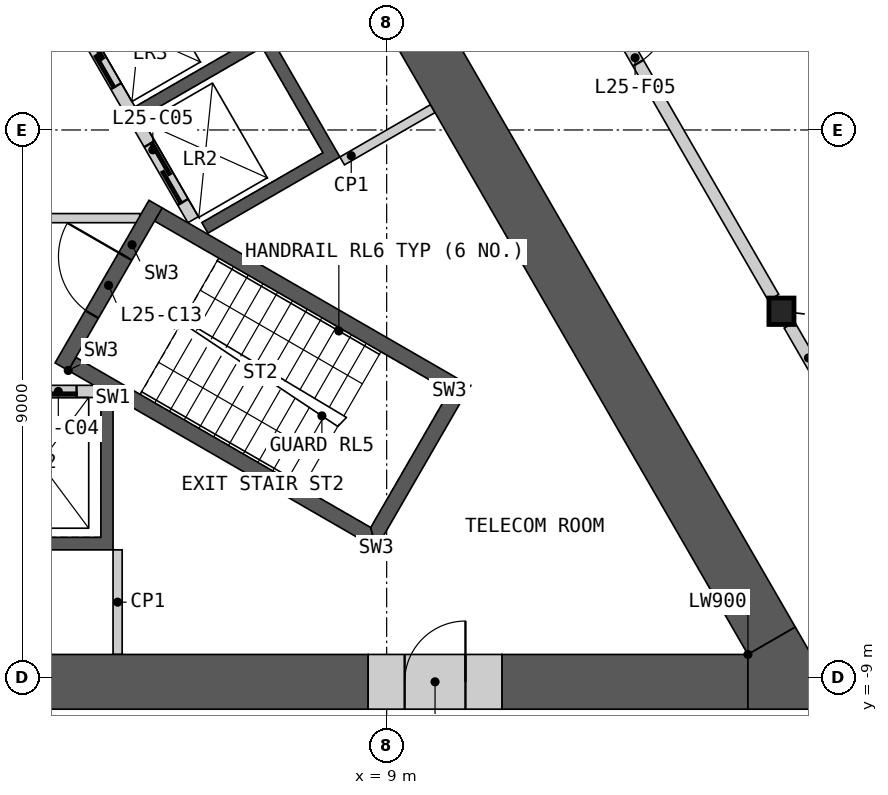
"""IFC4 building model, lengths in metres.
Left out: names, types, materials, properties, quantities, classifications, styles, units other than length and angle.
Written with IfcOpenShell. Run it as: python <this file> out.ifc"""

import sys

from ifc_helpers import new_model, si_unit, direction, frame, frame_2d, origin, origin_2d, place, context, subcontext, project, spatial, polyline, rectangle, i_section, outline, extrude, element, fill, save


model = new_model("IFC4")
c1 = context("Model", 3, precision=1e-05, world=origin(), true_north=direction((0.0, 1.0)))
c2 = subcontext(c1, "Body", "Model", "MODEL_VIEW")
j1 = project(units=[si_unit("LENGTHUNIT", "METRE"), si_unit("PLANEANGLEUNIT", "RADIAN")], contexts=[c1])
p1 = place(None, origin())
s1 = spatial("IfcSite", under=j1, at=p1, CompositionType="ELEMENT")
p2 = place(p1, origin())
s2 = spatial("IfcBuilding", under=s1, at=p2, CompositionType="ELEMENT")
p3 = place(p2, frame((0.0, 0.0, 120.6)))
s3 = spatial("IfcBuildingStorey", under=s2, at=p3, CompositionType="ELEMENT", Elevation=120.6)
p4 = place(p3, frame((15.493, -2.982, 0.0), z_axis=(0.0, 0.0, 1.0), x_axis=(1.0, 0.0, 0.0)))
e1 = element("IfcColumn", 1, at=p4, inside=s3, PredefinedType="COLUMN", context=c2, shape_type="SweptSolid", body=[
    extrude(i_section(OverallWidth=0.412, OverallDepth=0.435, WebThickness=0.036, FlangeThickness=0.057, at=origin_2d()), origin(), (0.0, 0.0, 1.0), 4.2),
])
p5 = place(p3, origin())
e2 = element("IfcWall", 2, at=p5, inside=s3, PredefinedType="SHEAR", context=c2, shape_type="SweptSolid", body=[
    extrude(outline(polyline([(4.5, -4.4), (4.5, -6.906), (-4.5, -6.906), (-4.5, -4.4), (-4.3, -4.4), (-4.3, -6.7), (-2.3, -6.7), (-2.3, -4.4), (-2.1, -4.4), (-2.1, -6.7), (-0.1, -6.7), (-0.1, -4.4), (0.1, -4.4), (0.1, -6.7), (2.1, -6.7), (2.1, -4.4), (2.3, -4.4), (2.3, -6.7), (4.3, -6.7), (4.3, -4.4), (4.5, -4.4)])), origin(), (0.0, 0.0, 1.0), 3.8),
])
p6 = place(p3, frame((-4.187, -4.3, 0.0), z_axis=(0.0, 0.0, 1.0), x_axis=(1.0, 0.0, 0.0)))
e3 = element("IfcWall", 3, at=p6, inside=s3, PredefinedType="SOLIDWALL", context=c2, shape_type="SweptSolid", body=[
    extrude(rectangle(XDim=8.373, YDim=0.2, at=frame_2d((4.187, 0.0))), origin(), (0.0, 0.0, 1.0), 3.8),
])
p7 = place(p6, frame((0.287, 0.0, 0.0)))
e4 = element("IfcOpeningElement", 4, at=p7, cuts=e3, PredefinedType="OPENING", context=c2, shape_type="SweptSolid", body=[
    extrude(rectangle(XDim=1.2, YDim=2.1, at=frame_2d((0.6, 1.05))), frame((0.0, 0.11, 0.0), z_axis=(0.0, -1.0, 0.0), x_axis=(1.0, 0.0, 0.0)), (0.0, 0.0, 1.0), 0.22),
])
p8 = place(p6, frame((2.387, 0.0, 0.0)))
e5 = element("IfcOpeningElement", 5, at=p8, cuts=e3, PredefinedType="OPENING", context=c2, shape_type="SweptSolid", body=[
    extrude(rectangle(XDim=1.4, YDim=2.1, at=frame_2d((0.7, 1.05))), frame((0.0, 0.11, 0.0), z_axis=(0.0, -1.0, 0.0), x_axis=(1.0, 0.0, 0.0)), (0.0, 0.0, 1.0), 0.22),
])
p9 = place(p6, frame((4.737, 0.0, 0.0)))
e6 = element("IfcOpeningElement", 6, at=p9, cuts=e3, PredefinedType="OPENING", context=c2, shape_type="SweptSolid", body=[
    extrude(rectangle(XDim=1.1, YDim=2.1, at=frame_2d((0.55, 1.05))), frame((0.0, 0.11, 0.0), z_axis=(0.0, -1.0, 0.0), x_axis=(1.0, 0.0, 0.0)), (0.0, 0.0, 1.0), 0.22),
])
p10 = place(p6, frame((6.887, 0.0, 0.0)))
e7 = element("IfcOpeningElement", 7, at=p10, cuts=e3, PredefinedType="OPENING", context=c2, shape_type="SweptSolid", body=[
    extrude(rectangle(XDim=1.2, YDim=2.1, at=frame_2d((0.6, 1.05))), frame((0.0, 0.11, 0.0), z_axis=(0.0, -1.0, 0.0), x_axis=(1.0, 0.0, 0.0)), (0.0, 0.0, 1.0), 0.22),
])
p11 = place(p3, origin())
e8 = element("IfcWall", 8, at=p11, inside=s3, PredefinedType="SHEAR", context=c2, shape_type="SweptSolid", body=[
    extrude(outline(polyline([(2.66, 4.192), (4.831, 5.445), (8.231, -0.444), (6.061, -1.697), (5.96, -1.524), (7.952, -0.374), (6.952, 1.358), (4.96, 0.208), (4.861, 0.381), (6.852, 1.531), (5.852, 3.263), (3.861, 2.113), (3.76, 2.287), (5.752, 3.437), (4.752, 5.169), (2.76, 4.019), (2.66, 4.192)])), origin(), (0.0, 0.0, 1.0), 3.8),
])
p12 = place(p3, frame((5.817, -1.476, 0.0), z_axis=(0.0, 0.0, 1.0), x_axis=(-0.500002616675, 0.866023893041, 0.0)))
e9 = element("IfcWall", 9, at=p12, inside=s3, PredefinedType="SOLIDWALL", context=c2, shape_type="SweptSolid", body=[
    extrude(rectangle(XDim=8.373, YDim=0.2, at=frame_2d((4.187, 0.0))), origin(), (0.0, 0.0, 1.0), 3.8),
])
p13 = place(p12, frame((0.337, 0.0, 0.0)))
e10 = element("IfcOpeningElement", 10, at=p13, cuts=e9, PredefinedType="OPENING", context=c2, shape_type="SweptSolid", body=[
    extrude(rectangle(XDim=1.1, YDim=2.1, at=frame_2d((0.55, 1.05))), frame((0.0, 0.11, 0.0), z_axis=(0.0, -1.0, 0.0), x_axis=(1.0, 0.0, 0.0)), (0.0, 0.0, 1.0), 0.22),
])
p14 = place(p12, frame((2.537, 0.0, 0.0)))
e11 = element("IfcOpeningElement", 11, at=p14, cuts=e9, PredefinedType="OPENING", context=c2, shape_type="SweptSolid", body=[
    extrude(rectangle(XDim=1.1, YDim=2.1, at=frame_2d((0.55, 1.05))), frame((0.0, 0.11, 0.0), z_axis=(0.0, -1.0, 0.0), x_axis=(1.0, 0.0, 0.0)), (0.0, 0.0, 1.0), 0.22),
])
p15 = place(p12, frame((4.737, 0.0, 0.0)))
e12 = element("IfcOpeningElement", 12, at=p15, cuts=e9, PredefinedType="OPENING", context=c2, shape_type="SweptSolid", body=[
    extrude(rectangle(XDim=1.1, YDim=2.1, at=frame_2d((0.55, 1.05))), frame((0.0, 0.11, 0.0), z_axis=(0.0, -1.0, 0.0), x_axis=(1.0, 0.0, 0.0)), (0.0, 0.0, 1.0), 0.22),
])
p16 = place(p12, frame((7.037, 0.0, 0.0)))
e13 = element("IfcOpeningElement", 13, at=p16, cuts=e9, PredefinedType="OPENING", context=c2, shape_type="SweptSolid", body=[
    extrude(rectangle(XDim=0.9, YDim=2.1, at=frame_2d((0.45, 1.05))), frame((0.0, 0.11, 0.0), z_axis=(0.0, -1.0, 0.0), x_axis=(1.0, 0.0, 0.0)), (0.0, 0.0, 1.0), 0.22),
])
p17 = place(p3, frame((-4.941, -1.45, 0.0), z_axis=(0.0, 0.0, 1.0), x_axis=(1.0, 0.0, 0.0)))
e14 = element("IfcWall", 14, at=p17, inside=s3, PredefinedType="PARTITIONING", context=c2, shape_type="SweptSolid", body=[
    extrude(rectangle(XDim=9.882, YDim=0.15, at=frame_2d((4.941, 0.0))), origin(), (0.0, 0.0, 1.0), 3.8),
])
p18 = place(p17, frame((4.391, 0.0, 0.0)))
e15 = element("IfcOpeningElement", 15, at=p18, cuts=e14, PredefinedType="OPENING", context=c2, shape_type="SweptSolid", body=[
    extrude(rectangle(XDim=1.1, YDim=2.1, at=frame_2d((0.55, 1.05))), frame((0.0, 0.085, 0.0), z_axis=(0.0, -1.0, 0.0), x_axis=(1.0, 0.0, 0.0)), (0.0, 0.0, 1.0), 0.17),
])
p19 = place(p3, origin())
e16 = element("IfcWall", 16, at=p19, inside=s3, PredefinedType="SHEAR", context=c2, shape_type="SweptSolid", body=[
    extrude(outline(polyline([(3.763, -3.956), (8.83, -6.881), (8.738, -6.539), (3.888, -3.739), (3.763, -3.956)])), origin(), (0.0, 0.0, 1.0), 3.8),
])
p20 = place(p3, origin())
e17 = element("IfcWall", 17, at=p20, inside=s3, PredefinedType="SHEAR", context=c2, shape_type="SweptSolid", body=[
    extrude(outline(polyline([(8.83, -6.881), (10.374, -4.206), (10.032, -4.298), (8.738, -6.539), (8.83, -6.881)])), origin(), (0.0, 0.0, 1.0), 3.8),
])
p21 = place(p3, origin())
e18 = element("IfcWall", 18, at=p21, inside=s3, PredefinedType="SHEAR", context=c2, shape_type="SweptSolid", body=[
    extrude(outline(polyline([(10.032, -4.298), (10.374, -4.206), (5.307, -1.281), (5.182, -1.498), (10.032, -4.298)])), origin(), (0.0, 0.0, 1.0), 3.8),
])
p22 = place(p3, frame((3.655, -3.893, 0.0), z_axis=(0.0, 0.0, 1.0), x_axis=(0.499982516597, 0.866035497597, 0.0)))
e19 = element("IfcWall", 19, at=p22, inside=s3, PredefinedType="SHEAR", context=c2, shape_type="SweptSolid", body=[
    extrude(rectangle(XDim=3.088, YDim=0.25, at=frame_2d((1.544, 0.0))), origin(), (0.0, 0.0, 1.0), 3.8),
])
p23 = place(p22, frame((0.994, 0.0, 0.0)))
e20 = element("IfcOpeningElement", 20, at=p23, cuts=e19, PredefinedType="OPENING", context=c2, shape_type="SweptSolid", body=[
    extrude(rectangle(XDim=1.1, YDim=2.1, at=frame_2d((0.55, 1.05))), frame((0.0, 0.135, 0.0), z_axis=(0.0, -1.0, 0.0), x_axis=(1.0, 0.0, 0.0)), (0.0, 0.0, 1.0), 0.27),
])
for number, where, z_axis, x_axis in (
    (21, (4.575, -6.906, 0.0), (0.0, 0.0, 1.0), (0.0, -1.0, 0.0)),
    (22, (8.268, -0.509, 0.0), (0.0, 0.0, 1.0), (0.866, 0.5, 0.0)),
):
    element("IfcWall", number, at=place(p3, frame(where, z_axis=z_axis, x_axis=x_axis)), inside=s3, PredefinedType="PARTITIONING", context=c2, shape_type="SweptSolid", body=[
        extrude(rectangle(XDim=1.72, YDim=0.15, at=frame_2d((0.86, 0.0))), origin(), (0.0, 0.0, 1.0), 3.8),
    ])
p24 = place(p3, frame((1.1, -9.076, 0.0), z_axis=(0.0, 0.0, 1.0), x_axis=(1.0, 0.0, 0.0)))
e23 = element("IfcWall", 23, at=p24, inside=s3, PredefinedType="SHEAR", context=c2, shape_type="SweptSolid", body=[
    extrude(rectangle(XDim=7.595, YDim=0.9, at=frame_2d((3.798, 0.0))), origin(), (0.0, 0.0, 1.0), 3.8),
])
p25 = place(p3, frame((10.896, -9.076, 0.0), z_axis=(0.0, 0.0, 1.0), x_axis=(1.0, 0.0, 0.0)))
e24 = element("IfcWall", 24, at=p25, inside=s3, PredefinedType="SHEAR", context=c2, shape_type="SweptSolid", body=[
    extrude(rectangle(XDim=4.046, YDim=0.9, at=frame_2d((2.023, 0.0))), origin(), (0.0, 0.0, 1.0), 3.8),
])
p26 = place(p3, frame((15.331, -8.401, 0.0), z_axis=(0.0, 0.0, 1.0), x_axis=(-0.49999216708, 0.866029926076, 0.0)))
e25 = element("IfcWall", 25, at=p26, inside=s3, PredefinedType="SHEAR", context=c2, shape_type="SweptSolid", body=[
    extrude(rectangle(XDim=12.641, YDim=0.9, at=frame_2d((6.321, 0.0))), origin(), (0.0, 0.0, 1.0), 3.8),
])
p27 = place(p3, origin())
e26 = element("IfcWall", 26, at=p27, inside=s3, PredefinedType="SHEAR", context=c2, shape_type="SweptSolid", body=[
    extrude(outline(polyline([(14.941, -8.626), (15.721, -8.176), (16.5, -9.526), (14.941, -9.526), (14.941, -8.626)])), origin(), (0.0, 0.0, 1.0), 3.8),
])
p28 = place(p3, frame((8.696, -9.076, 0.0), z_axis=(0.0, 0.0, 1.0), x_axis=(1.0, 0.0, 0.0)))
e27 = element("IfcWall", 27, at=p28, inside=s3, PredefinedType="SHEAR", context=c2, shape_type="SweptSolid", body=[
    extrude(rectangle(XDim=2.2, YDim=0.9, at=frame_2d((1.1, 0.0))), origin(), (0.0, 0.0, 1.0), 3.8),
])
p29 = place(p28, frame((0.6, 0.0, 0.0)))
e28 = element("IfcOpeningElement", 28, at=p29, cuts=e27, PredefinedType="OPENING", context=c2, shape_type="SweptSolid", body=[
    extrude(rectangle(XDim=1.0, YDim=2.1, at=frame_2d((0.5, 1.05))), frame((0.0, 0.46, 0.0), z_axis=(0.0, -1.0, 0.0), x_axis=(1.0, 0.0, 0.0)), (0.0, 0.0, 1.0), 0.92),
])
p30 = place(p3, frame((10.46, 5.736, 0.0), z_axis=(0.0, 0.0, 1.0), x_axis=(0.500004141693, -0.866023012564, 0.0)))
e29 = element("IfcWall", 29, at=p30, inside=s3, PredefinedType="PARTITIONING", context=c2, shape_type="SweptSolid", body=[
    extrude(rectangle(XDim=9.803, YDim=0.2, at=frame_2d((4.902, 0.0))), origin(), (0.0, 0.0, 1.0), 3.8),
])
p31 = place(p30, frame((4.352, 0.0, 0.0)))
e30 = element("IfcOpeningElement", 30, at=p31, cuts=e29, PredefinedType="OPENING", context=c2, shape_type="SweptSolid", body=[
    extrude(rectangle(XDim=1.0, YDim=2.1, at=frame_2d((0.5, 1.05))), frame((0.0, 0.11, 0.0), z_axis=(0.0, -1.0, 0.0), x_axis=(1.0, 0.0, 0.0)), (0.0, 0.0, 1.0), 0.22),
])
p32 = place(p3, frame((15.624, -3.209, 0.0), z_axis=(0.0, 0.0, 1.0), x_axis=(0.499997920671, -0.866026604282, 0.0)))
e31 = element("IfcWall", 31, at=p32, inside=s3, PredefinedType="PARTITIONING", context=c2, shape_type="SweptSolid", body=[
    extrude(rectangle(XDim=6.24, YDim=0.2, at=frame_2d((3.12, 0.0))), origin(), (0.0, 0.0, 1.0), 3.8),
])
p33 = place(p10, origin())
e32 = element("IfcDoor", 32, at=p33, inside=s3, OperationType="SLIDING_TO_LEFT", PredefinedType="DOOR", context=c2, shape_type="SweptSolid", body=[
    extrude(rectangle(XDim=1.2, YDim=2.1, at=frame_2d((0.6, 1.05))), frame((0.0, 0.025, 0.0), z_axis=(0.0, -1.0, 0.0), x_axis=(1.0, 0.0, 0.0)), (0.0, 0.0, 1.0), 0.05),
])
fill(e7, e32)
p34 = place(p13, origin())
e33 = element("IfcDoor", 33, at=p34, inside=s3, OperationType="SLIDING_TO_LEFT", PredefinedType="DOOR", context=c2, shape_type="SweptSolid", body=[
    extrude(rectangle(XDim=1.1, YDim=2.1, at=frame_2d((0.55, 1.05))), frame((0.0, 0.025, 0.0), z_axis=(0.0, -1.0, 0.0), x_axis=(1.0, 0.0, 0.0)), (0.0, 0.0, 1.0), 0.05),
])
fill(e10, e33)
p35 = place(p14, origin())
e34 = element("IfcDoor", 34, at=p35, inside=s3, OperationType="SLIDING_TO_LEFT", PredefinedType="DOOR", context=c2, shape_type="SweptSolid", body=[
    extrude(rectangle(XDim=1.1, YDim=2.1, at=frame_2d((0.55, 1.05))), frame((0.0, 0.025, 0.0), z_axis=(0.0, -1.0, 0.0), x_axis=(1.0, 0.0, 0.0)), (0.0, 0.0, 1.0), 0.05),
])
fill(e11, e34)
p36 = place(p23, origin())
e35 = element("IfcDoor", 35, at=p36, inside=s3, OperationType="SINGLE_SWING_RIGHT", PredefinedType="DOOR", context=c2, shape_type="SweptSolid", body=[
    extrude(rectangle(XDim=1.1, YDim=2.1, at=frame_2d((0.55, 1.05))), frame((0.0, 0.025, 0.0), z_axis=(0.0, -1.0, 0.0), x_axis=(1.0, 0.0, 0.0)), (0.0, 0.0, 1.0), 0.05),
])
fill(e20, e35)
p37 = place(p29, origin())
e36 = element("IfcDoor", 36, at=p37, inside=s3, OperationType="SINGLE_SWING_RIGHT", PredefinedType="DOOR", context=c2, shape_type="SweptSolid", body=[
    extrude(rectangle(XDim=1.0, YDim=2.1, at=frame_2d((0.5, 1.05))), frame((0.0, 0.205, 0.0), z_axis=(0.0, -1.0, 0.0), x_axis=(1.0, 0.0, 0.0)), (0.0, 0.0, 1.0), 0.05),
])
fill(e28, e36)
p38 = place(p31, origin())
e37 = element("IfcDoor", 37, at=p38, inside=s3, OperationType="SINGLE_SWING_LEFT", PredefinedType="DOOR", context=c2, shape_type="SweptSolid", body=[
    extrude(rectangle(XDim=1.0, YDim=2.1, at=frame_2d((0.5, 1.05))), frame((0.0, 0.025, 0.0), z_axis=(0.0, -1.0, 0.0), x_axis=(1.0, 0.0, 0.0)), (0.0, 0.0, 1.0), 0.05),
])
fill(e30, e37)
save(model, sys.argv[1])
